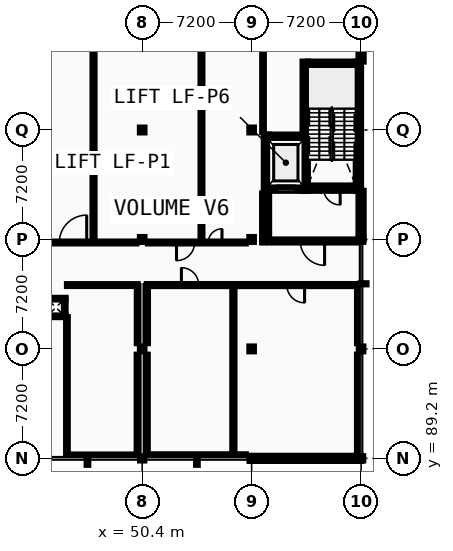
"""IFC4 building model, lengths in metres.
Left out: names, types, materials, properties, quantities, classifications, styles, units other than length and angle.
Written with IfcOpenShell. Run it as: python <this file> out.ifc"""

import sys

from ifc_helpers import new_model, si_unit, direction, frame, frame_2d, origin, origin_2d, place, context, subcontext, project, spatial, rectangle, i_section, extrude, element, fill, save


model = new_model("IFC4")
c1 = context("Model", 3, precision=1e-05, world=origin(), true_north=direction((0.0, 1.0)))
c2 = subcontext(c1, "Body", "Model", "MODEL_VIEW")
j1 = project(units=[si_unit("LENGTHUNIT", "METRE"), si_unit("PLANEANGLEUNIT", "RADIAN")], contexts=[c1])
p1 = place(None, origin())
s1 = spatial("IfcSite", under=j1, at=p1, CompositionType="ELEMENT")
p2 = place(p1, origin())
s2 = spatial("IfcBuilding", under=s1, at=p2, CompositionType="ELEMENT")
p3 = place(p2, frame((0.0, 0.0, 18.4)))
s3 = spatial("IfcBuildingStorey", under=s2, at=p3, CompositionType="ELEMENT", Elevation=18.4)
p4 = place(p3, frame((50.4, 89.2, 0.0), z_axis=(0.0, 0.0, 1.0), x_axis=(1.0, 0.0, 0.0)))
e1 = element("IfcColumn", 1, at=p4, inside=s3, PredefinedType="COLUMN", context=c2, shape_type="SweptSolid", body=[
    extrude(i_section(OverallWidth=0.28, OverallDepth=0.28, WebThickness=0.01, FlangeThickness=0.018, FilletRadius=0.024, at=origin_2d()), origin(), (0.0, 0.0, 1.0), 4.4),
])
for number, where, z_axis, x_axis in (
    (2, (50.4, 96.4, 0.0), (0.0, 0.0, 1.0), (1.0, 0.0, 0.0)),
    (3, (50.4, 103.6, 0.0), (0.0, 0.0, 1.0), (1.0, 0.0, 0.0)),
    (4, (50.4, 110.8, 0.0), (0.0, 0.0, 1.0), (1.0, 0.0, 0.0)),
):
    element("IfcColumn", number, at=place(p3, frame(where, z_axis=z_axis, x_axis=x_axis)), inside=s3, PredefinedType="COLUMN", context=c2, shape_type="SweptSolid", body=[
        extrude(i_section(OverallWidth=0.3, OverallDepth=0.32, WebThickness=0.011, FlangeThickness=0.021, FilletRadius=0.027, at=origin_2d()), origin(), (0.0, 0.0, 1.0), 4.4),
    ])
p5 = place(p3, frame((57.6, 89.2, 0.0), z_axis=(0.0, 0.0, 1.0), x_axis=(1.0, 0.0, 0.0)))
e5 = element("IfcColumn", 5, at=p5, inside=s3, PredefinedType="COLUMN", context=c2, shape_type="SweptSolid", body=[
    extrude(i_section(OverallWidth=0.28, OverallDepth=0.28, WebThickness=0.01, FlangeThickness=0.018, FilletRadius=0.024, at=origin_2d()), origin(), (0.0, 0.0, 1.0), 4.4),
])
for number, where, z_axis, x_axis in (
    (6, (57.6, 96.4, 0.0), (0.0, 0.0, 1.0), (1.0, 0.0, 0.0)),
    (7, (57.6, 103.6, 0.0), (0.0, 0.0, 1.0), (1.0, 0.0, 0.0)),
    (8, (57.6, 110.8, 0.0), (0.0, 0.0, 1.0), (1.0, 0.0, 0.0)),
):
    element("IfcColumn", number, at=place(p3, frame(where, z_axis=z_axis, x_axis=x_axis)), inside=s3, PredefinedType="COLUMN", context=c2, shape_type="SweptSolid", body=[
        extrude(i_section(OverallWidth=0.3, OverallDepth=0.32, WebThickness=0.011, FlangeThickness=0.021, FilletRadius=0.027, at=origin_2d()), origin(), (0.0, 0.0, 1.0), 4.4),
    ])
p6 = place(p3, frame((64.8, 89.2, 0.0), z_axis=(0.0, 0.0, 1.0), x_axis=(1.0, 0.0, 0.0)))
e9 = element("IfcColumn", 9, at=p6, inside=s3, PredefinedType="COLUMN", context=c2, shape_type="SweptSolid", body=[
    extrude(i_section(OverallWidth=0.28, OverallDepth=0.28, WebThickness=0.01, FlangeThickness=0.018, FilletRadius=0.024, at=origin_2d()), origin(), (0.0, 0.0, 1.0), 4.4),
])
for number, where, z_axis, x_axis in (
    (10, (64.8, 96.4, 0.0), (0.0, 0.0, 1.0), (1.0, 0.0, 0.0)),
    (11, (64.8, 103.6, 0.0), (0.0, 0.0, 1.0), (1.0, 0.0, 0.0)),
):
    element("IfcColumn", number, at=place(p3, frame(where, z_axis=z_axis, x_axis=x_axis)), inside=s3, PredefinedType="COLUMN", context=c2, shape_type="SweptSolid", body=[
        extrude(i_section(OverallWidth=0.3, OverallDepth=0.32, WebThickness=0.011, FlangeThickness=0.021, FilletRadius=0.027, at=origin_2d()), origin(), (0.0, 0.0, 1.0), 4.4),
    ])
p7 = place(p3, frame((57.49, 89.2, 0.0), z_axis=(0.0, 0.0, 1.0), x_axis=(1.0, 0.0, 0.0)))
e12 = element("IfcWall", 12, at=p7, inside=s3, PredefinedType="STANDARD", context=c2, shape_type="SweptSolid", body=[
    extrude(rectangle(XDim=7.31, YDim=0.34, at=frame_2d((3.655, 0.0))), origin(), (0.0, 0.0, 1.0), 3.94),
])
p8 = place(p7, frame((1.661, 0.0, 0.95)))
e13 = element("IfcOpeningElement", 13, at=p8, cuts=e12, PredefinedType="OPENING", context=c2, shape_type="SweptSolid", body=[
    extrude(rectangle(XDim=1.064, YDim=1.26, at=frame_2d((0.532, 0.63))), frame((0.0, 0.18, 0.0), z_axis=(0.0, -1.0, 0.0), x_axis=(1.0, 0.0, 0.0)), (0.0, 0.0, 1.0), 0.36),
])
p9 = place(p7, frame((4.585, 0.0, 0.95)))
e14 = element("IfcOpeningElement", 14, at=p9, cuts=e12, PredefinedType="OPENING", context=c2, shape_type="SweptSolid", body=[
    extrude(rectangle(XDim=1.064, YDim=1.26, at=frame_2d((0.532, 0.63))), frame((0.0, 0.18, 0.0), z_axis=(0.0, -1.0, 0.0), x_axis=(1.0, 0.0, 0.0)), (0.0, 0.0, 1.0), 0.36),
])
p10 = place(p3, frame((64.8, 103.6, 0.0), z_axis=(0.0, 0.0, 1.0), x_axis=(0.0, 1.0, 0.0)))
e15 = element("IfcWall", 15, at=p10, inside=s3, PredefinedType="STANDARD", context=c2, shape_type="SweptSolid", body=[
    extrude(rectangle(XDim=3.2, YDim=0.34, at=frame_2d((1.6, 0.0))), origin(), (0.0, 0.0, 1.0), 4.215),
])
p11 = place(p10, frame((1.17, 0.0, 0.95)))
e16 = element("IfcOpeningElement", 16, at=p11, cuts=e15, PredefinedType="OPENING", context=c2, shape_type="SweptSolid", body=[
    extrude(rectangle(XDim=0.86, YDim=1.296, at=frame_2d((0.43, 0.648))), frame((0.0, 0.18, 0.0), z_axis=(0.0, -1.0, 0.0), x_axis=(1.0, 0.0, 0.0)), (0.0, 0.0, 1.0), 0.36),
])
p12 = place(p3, frame((64.8, 115.3, 0.0), z_axis=(0.0, 0.0, 1.0), x_axis=(0.0, 1.0, 0.0)))
e17 = element("IfcWall", 17, at=p12, inside=s3, PredefinedType="STANDARD", context=c2, shape_type="SweptSolid", body=[
    extrude(rectangle(XDim=2.53, YDim=0.34, at=frame_2d((1.265, 0.0))), origin(), (0.0, 0.0, 1.0), 4.215),
])
p13 = place(p3, frame((61.3, 106.975, 0.0), z_axis=(0.0, 0.0, 1.0), x_axis=(1.0, 0.0, 0.0)))
e18 = element("IfcWall", 18, at=p13, inside=s3, PredefinedType="SHEAR", context=c2, shape_type="SweptSolid", body=[
    extrude(rectangle(XDim=3.15, YDim=0.35, at=frame_2d((1.575, 0.0))), origin(), (0.0, 0.0, 1.0), 4.215),
])
p14 = place(p13, frame((1.025, 0.0, 0.0)))
e19 = element("IfcOpeningElement", 19, at=p14, cuts=e18, PredefinedType="OPENING", context=c2, shape_type="SweptSolid", body=[
    extrude(rectangle(XDim=1.1, YDim=2.15, at=frame_2d((0.55, 1.075))), frame((0.0, 0.185, 0.0), z_axis=(0.0, -1.0, 0.0), x_axis=(1.0, 0.0, 0.0)), (0.0, 0.0, 1.0), 0.37),
])
p15 = place(p3, frame((61.3, 115.125, 0.0), z_axis=(0.0, 0.0, 1.0), x_axis=(1.0, 0.0, 0.0)))
e20 = element("IfcWall", 20, at=p15, inside=s3, PredefinedType="SHEAR", context=c2, shape_type="SweptSolid", body=[
    extrude(rectangle(XDim=3.15, YDim=0.35, at=frame_2d((1.575, 0.0))), origin(), (0.0, 0.0, 1.0), 4.215),
])
for number, where, z_axis, x_axis in (
    (21, (61.125, 106.8, 0.0), (0.0, 0.0, 1.0), (0.0, 1.0, 0.0)),
    (22, (64.625, 106.8, 0.0), (0.0, 0.0, 1.0), (0.0, 1.0, 0.0)),
):
    element("IfcWall", number, at=place(p3, frame(where, z_axis=z_axis, x_axis=x_axis)), inside=s3, PredefinedType="SHEAR", context=c2, shape_type="SweptSolid", body=[
        extrude(rectangle(XDim=8.5, YDim=0.35, at=frame_2d((4.25, 0.0))), origin(), (0.0, 0.0, 1.0), 4.215),
    ])
p16 = place(p3, frame((58.75, 106.975, 0.0), z_axis=(0.0, 0.0, 1.0), x_axis=(1.0, 0.0, 0.0)))
e23 = element("IfcWall", 23, at=p16, inside=s3, PredefinedType="SHEAR", context=c2, shape_type="SweptSolid", body=[
    extrude(rectangle(XDim=2.2, YDim=0.35, at=frame_2d((1.1, 0.0))), origin(), (0.0, 0.0, 1.0), 4.215),
])
p17 = place(p16, frame((0.5, 0.0, 0.0)))
e24 = element("IfcOpeningElement", 24, at=p17, cuts=e23, PredefinedType="OPENING", context=c2, shape_type="SweptSolid", body=[
    extrude(rectangle(XDim=1.2, YDim=2.2, at=frame_2d((0.6, 1.1))), frame((0.0, 0.185, 0.0), z_axis=(0.0, -1.0, 0.0), x_axis=(1.0, 0.0, 0.0)), (0.0, 0.0, 1.0), 0.37),
])
p18 = place(p3, frame((58.75, 110.325, 0.0), z_axis=(0.0, 0.0, 1.0), x_axis=(1.0, 0.0, 0.0)))
e25 = element("IfcWall", 25, at=p18, inside=s3, PredefinedType="SHEAR", context=c2, shape_type="SweptSolid", body=[
    extrude(rectangle(XDim=2.2, YDim=0.35, at=frame_2d((1.1, 0.0))), origin(), (0.0, 0.0, 1.0), 4.215),
])
p19 = place(p3, frame((58.575, 106.8, 0.0), z_axis=(0.0, 0.0, 1.0), x_axis=(0.0, 1.0, 0.0)))
e26 = element("IfcWall", 26, at=p19, inside=s3, PredefinedType="SHEAR", context=c2, shape_type="SweptSolid", body=[
    extrude(rectangle(XDim=3.7, YDim=0.35, at=frame_2d((1.85, 0.0))), origin(), (0.0, 0.0, 1.0), 4.215),
])
p20 = place(p3, frame((58.75, 103.5, 0.0), z_axis=(0.0, 0.0, 1.0), x_axis=(1.0, 0.0, 0.0)))
e27 = element("IfcWall", 27, at=p20, inside=s3, PredefinedType="PARTITIONING", context=c2, shape_type="SweptSolid", body=[
    extrude(rectangle(XDim=5.7, YDim=0.2, at=frame_2d((2.85, 0.0))), origin(), (0.0, 0.0, 1.0), 3.95),
])
p21 = place(p20, frame((2.05, 0.0, 0.0)))
e28 = element("IfcOpeningElement", 28, at=p21, cuts=e27, PredefinedType="OPENING", context=c2, shape_type="SweptSolid", body=[
    extrude(rectangle(XDim=1.6, YDim=2.2, at=frame_2d((0.8, 1.1))), frame((0.0, 0.11, 0.0), z_axis=(0.0, -1.0, 0.0), x_axis=(1.0, 0.0, 0.0)), (0.0, 0.0, 1.0), 0.22),
])
p22 = place(p3, frame((58.65, 103.6, 0.0), z_axis=(0.0, 0.0, 1.0), x_axis=(0.0, 1.0, 0.0)))
e29 = element("IfcWall", 29, at=p22, inside=s3, PredefinedType="PARTITIONING", context=c2, shape_type="SweptSolid", body=[
    extrude(rectangle(XDim=3.2, YDim=0.2, at=frame_2d((1.6, 0.0))), origin(), (0.0, 0.0, 1.0), 4.215),
])
for number, where, z_axis, x_axis in (
    (30, (44.09, 98.545, 0.0), (0.0, 0.0, 1.0), (1.0, 0.0, 0.0)),
    (31, (44.09, 99.705, 0.0), (0.0, 0.0, 1.0), (1.0, 0.0, 0.0)),
):
    element("IfcWall", number, at=place(p3, frame(where, z_axis=z_axis, x_axis=x_axis)), inside=s3, PredefinedType="PARTITIONING", context=c2, shape_type="SweptSolid", body=[
        extrude(rectangle(XDim=1.27, YDim=0.11, at=frame_2d((0.635, 0.0))), origin(), (0.0, 0.0, 1.0), 4.215),
    ])
p23 = place(p3, frame((45.305, 98.6, 0.0), z_axis=(0.0, 0.0, 1.0), x_axis=(0.0, 1.0, 0.0)))
e32 = element("IfcWall", 32, at=p23, inside=s3, PredefinedType="PARTITIONING", context=c2, shape_type="SweptSolid", body=[
    extrude(rectangle(XDim=1.05, YDim=0.11, at=frame_2d((0.525, 0.0))), origin(), (0.0, 0.0, 1.0), 4.215),
])
p24 = place(p3, frame((45.45, 89.4, 0.0), z_axis=(0.0, 0.0, 1.0), x_axis=(1.0, 0.0, 0.0)))
e33 = element("IfcWall", 33, at=p24, inside=s3, PredefinedType="PARTITIONING", context=c2, shape_type="SweptSolid", body=[
    extrude(rectangle(XDim=4.57, YDim=0.11, at=frame_2d((2.285, 0.0))), origin(), (0.0, 0.0, 1.0), 3.94),
])
p25 = place(p3, frame((50.78, 89.4, 0.0), z_axis=(0.0, 0.0, 1.0), x_axis=(1.0, 0.0, 0.0)))
e34 = element("IfcWall", 34, at=p25, inside=s3, PredefinedType="PARTITIONING", context=c2, shape_type="SweptSolid", body=[
    extrude(rectangle(XDim=6.44, YDim=0.135, at=frame_2d((3.22, 0.0))), origin(), (0.0, 0.0, 1.0), 3.94),
])
p26 = place(p3, frame((45.45, 100.6, 0.0), z_axis=(0.0, 0.0, 1.0), x_axis=(1.0, 0.0, 0.0)))
e35 = element("IfcWall", 35, at=p26, inside=s3, PredefinedType="PARTITIONING", context=c2, shape_type="SweptSolid", body=[
    extrude(rectangle(XDim=4.65, YDim=0.125, at=frame_2d((2.325, 0.0))), origin(), (0.0, 0.0, 1.0), 4.215),
])
p27 = place(p26, frame((0.45, 0.0, 0.0)))
e36 = element("IfcOpeningElement", 36, at=p27, cuts=e35, PredefinedType="OPENING", context=c2, shape_type="SweptSolid", body=[
    extrude(rectangle(XDim=1.0, YDim=2.1, at=frame_2d((0.5, 1.05))), frame((0.0, 0.073, 0.0), z_axis=(0.0, -1.0, 0.0), x_axis=(1.0, 0.0, 0.0)), (0.0, 0.0, 1.0), 0.145),
])
p28 = place(p3, frame((50.7, 100.6, 0.0), z_axis=(0.0, 0.0, 1.0), x_axis=(1.0, 0.0, 0.0)))
e37 = element("IfcWall", 37, at=p28, inside=s3, PredefinedType="PARTITIONING", context=c2, shape_type="SweptSolid", body=[
    extrude(rectangle(XDim=13.9, YDim=0.135, at=frame_2d((6.95, 0.0))), origin(), (0.0, 0.0, 1.0), 4.215),
])
p29 = place(p28, frame((2.28, 0.0, 0.0)))
e38 = element("IfcOpeningElement", 38, at=p29, cuts=e37, PredefinedType="OPENING", context=c2, shape_type="SweptSolid", body=[
    extrude(rectangle(XDim=1.14, YDim=2.068, at=frame_2d((0.57, 1.034))), frame((0.0, 0.078, 0.0), z_axis=(0.0, -1.0, 0.0), x_axis=(1.0, 0.0, 0.0)), (0.0, 0.0, 1.0), 0.155),
])
p30 = place(p28, frame((9.217, 0.0, 0.0)))
e39 = element("IfcOpeningElement", 39, at=p30, cuts=e37, PredefinedType="OPENING", context=c2, shape_type="SweptSolid", body=[
    extrude(rectangle(XDim=1.166, YDim=2.068, at=frame_2d((0.583, 1.034))), frame((0.0, 0.078, 0.0), z_axis=(0.0, -1.0, 0.0), x_axis=(1.0, 0.0, 0.0)), (0.0, 0.0, 1.0), 0.155),
])
p31 = place(p3, frame((43.58, 103.4, 0.0), z_axis=(0.0, 0.0, 1.0), x_axis=(1.0, 0.0, 0.0)))
e40 = element("IfcWall", 40, at=p31, inside=s3, PredefinedType="PARTITIONING", context=c2, shape_type="SweptSolid", body=[
    extrude(rectangle(XDim=6.44, YDim=0.125, at=frame_2d((3.22, 0.0))), origin(), (0.0, 0.0, 1.0), 3.95),
])
p32 = place(p31, frame((1.37, 0.0, 0.0)))
e41 = element("IfcOpeningElement", 41, at=p32, cuts=e40, PredefinedType="OPENING", context=c2, shape_type="SweptSolid", body=[
    extrude(rectangle(XDim=1.8, YDim=2.3, at=frame_2d((0.9, 1.15))), frame((0.0, 0.073, 0.0), z_axis=(0.0, -1.0, 0.0), x_axis=(1.0, 0.0, 0.0)), (0.0, 0.0, 1.0), 0.145),
])
p33 = place(p3, frame((50.78, 103.4, 0.0), z_axis=(0.0, 0.0, 1.0), x_axis=(1.0, 0.0, 0.0)))
e42 = element("IfcWall", 42, at=p33, inside=s3, PredefinedType="PARTITIONING", context=c2, shape_type="SweptSolid", body=[
    extrude(rectangle(XDim=6.44, YDim=0.125, at=frame_2d((3.22, 0.0))), origin(), (0.0, 0.0, 1.0), 3.95),
])
p34 = place(p33, frame((3.97, 0.0, 0.0)))
e43 = element("IfcOpeningElement", 43, at=p34, cuts=e42, PredefinedType="OPENING", context=c2, shape_type="SweptSolid", body=[
    extrude(rectangle(XDim=0.9, YDim=2.1, at=frame_2d((0.45, 1.05))), frame((0.0, 0.073, 0.0), z_axis=(0.0, -1.0, 0.0), x_axis=(1.0, 0.0, 0.0)), (0.0, 0.0, 1.0), 0.145),
])
p35 = place(p33, frame((1.878, 0.0, 0.0)))
e44 = element("IfcOpeningElement", 44, at=p35, cuts=e42, PredefinedType="OPENING", context=c2, shape_type="SweptSolid", body=[
    extrude(rectangle(XDim=1.192, YDim=2.068, at=frame_2d((0.596, 1.034))), frame((0.0, 0.073, 0.0), z_axis=(0.0, -1.0, 0.0), x_axis=(1.0, 0.0, 0.0)), (0.0, 0.0, 1.0), 0.145),
])
p36 = place(p3, frame((45.45, 89.455, 0.0), z_axis=(0.0, 0.0, 1.0), x_axis=(0.0, 1.0, 0.0)))
e45 = element("IfcWall", 45, at=p36, inside=s3, PredefinedType="PARTITIONING", context=c2, shape_type="SweptSolid", body=[
    extrude(rectangle(XDim=9.035, YDim=0.11, at=frame_2d((4.518, 0.0))), origin(), (0.0, 0.0, 1.0), 3.96),
])
p37 = place(p3, frame((47.2, 103.462, 0.0), z_axis=(0.0, 0.0, 1.0), x_axis=(0.0, 1.0, 0.0)))
e46 = element("IfcWall", 46, at=p37, inside=s3, PredefinedType="PARTITIONING", context=c2, shape_type="SweptSolid", body=[
    extrude(rectangle(XDim=14.338, YDim=0.135, at=frame_2d((7.169, 0.0))), origin(), (0.0, 0.0, 1.0), 4.215),
])
p38 = place(p3, frame((50.1, 89.58, 0.0), z_axis=(0.0, 0.0, 1.0), x_axis=(0.0, 1.0, 0.0)))
e47 = element("IfcWall", 47, at=p38, inside=s3, PredefinedType="PARTITIONING", context=c2, shape_type="SweptSolid", body=[
    extrude(rectangle(XDim=6.44, YDim=0.125, at=frame_2d((3.22, 0.0))), origin(), (0.0, 0.0, 1.0), 4.215),
])
p39 = place(p3, frame((50.1, 96.78, 0.0), z_axis=(0.0, 0.0, 1.0), x_axis=(0.0, 1.0, 0.0)))
e48 = element("IfcWall", 48, at=p39, inside=s3, PredefinedType="PARTITIONING", context=c2, shape_type="SweptSolid", body=[
    extrude(rectangle(XDim=3.758, YDim=0.11, at=frame_2d((1.879, 0.0))), origin(), (0.0, 0.0, 1.0), 4.215),
])
p40 = place(p3, frame((50.7, 89.58, 0.0), z_axis=(0.0, 0.0, 1.0), x_axis=(0.0, 1.0, 0.0)))
e49 = element("IfcWall", 49, at=p40, inside=s3, PredefinedType="PARTITIONING", context=c2, shape_type="SweptSolid", body=[
    extrude(rectangle(XDim=6.44, YDim=0.135, at=frame_2d((3.22, 0.0))), origin(), (0.0, 0.0, 1.0), 4.215),
])
p41 = place(p3, frame((50.7, 96.78, 0.0), z_axis=(0.0, 0.0, 1.0), x_axis=(0.0, 1.0, 0.0)))
e50 = element("IfcWall", 50, at=p41, inside=s3, PredefinedType="PARTITIONING", context=c2, shape_type="SweptSolid", body=[
    extrude(rectangle(XDim=3.752, YDim=0.16, at=frame_2d((1.876, 0.0))), origin(), (0.0, 0.0, 1.0), 3.91),
])
p42 = place(p3, frame((54.3, 103.462, 0.0), z_axis=(0.0, 0.0, 1.0), x_axis=(0.0, 1.0, 0.0)))
e51 = element("IfcWall", 51, at=p42, inside=s3, PredefinedType="PARTITIONING", context=c2, shape_type="SweptSolid", body=[
    extrude(rectangle(XDim=14.338, YDim=0.125, at=frame_2d((7.169, 0.0))), origin(), (0.0, 0.0, 1.0), 4.215),
])
p43 = place(p3, frame((56.4, 89.468, 0.0), z_axis=(0.0, 0.0, 1.0), x_axis=(0.0, 1.0, 0.0)))
e52 = element("IfcWall", 52, at=p43, inside=s3, PredefinedType="PARTITIONING", context=c2, shape_type="SweptSolid", body=[
    extrude(rectangle(XDim=11.065, YDim=0.142, at=frame_2d((5.532, 0.0))), origin(), (0.0, 0.0, 1.0), 4.215),
])
p44 = place(p3, frame((58.35, 103.4, 0.0), z_axis=(0.0, 0.0, 1.0), x_axis=(0.0, 1.0, 0.0)))
e53 = element("IfcWall", 53, at=p44, inside=s3, PredefinedType="PARTITIONING", context=c2, shape_type="SweptSolid", body=[
    extrude(rectangle(XDim=3.225, YDim=0.125, at=frame_2d((1.613, 0.0))), origin(), (0.0, 0.0, 1.0), 4.215),
])
p45 = place(p3, frame((58.35, 110.675, 0.0), z_axis=(0.0, 0.0, 1.0), x_axis=(0.0, 1.0, 0.0)))
e54 = element("IfcWall", 54, at=p45, inside=s3, PredefinedType="PARTITIONING", context=c2, shape_type="SweptSolid", body=[
    extrude(rectangle(XDim=7.125, YDim=0.11, at=frame_2d((3.562, 0.0))), origin(), (0.0, 0.0, 1.0), 4.215),
])
p46 = place(p3, frame((64.6, 89.58, 0.0), z_axis=(0.0, 0.0, 1.0), x_axis=(0.0, 1.0, 0.0)))
e55 = element("IfcWall", 55, at=p46, inside=s3, PredefinedType="PARTITIONING", context=c2, shape_type="SweptSolid", body=[
    extrude(rectangle(XDim=6.44, YDim=0.142, at=frame_2d((3.22, 0.0))), origin(), (0.0, 0.0, 1.0), 3.89),
])
p47 = place(p3, frame((64.6, 96.78, 0.0), z_axis=(0.0, 0.0, 1.0), x_axis=(0.0, 1.0, 0.0)))
e56 = element("IfcWall", 56, at=p47, inside=s3, PredefinedType="PARTITIONING", context=c2, shape_type="SweptSolid", body=[
    extrude(rectangle(XDim=3.752, YDim=0.135, at=frame_2d((1.876, 0.0))), origin(), (0.0, 0.0, 1.0), 3.9),
])
p48 = place(p8, origin())
e57 = element("IfcWindow", 57, at=p48, inside=s3, PartitioningType="SINGLE_PANEL", PredefinedType="WINDOW", context=c2, shape_type="SweptSolid", body=[
    extrude(rectangle(XDim=1.064, YDim=1.26, at=frame_2d((0.532, 0.63))), frame((0.0, 0.03, 0.0), z_axis=(0.0, -1.0, 0.0), x_axis=(1.0, 0.0, 0.0)), (0.0, 0.0, 1.0), 0.06),
])
fill(e13, e57)
p49 = place(p9, origin())
e58 = element("IfcWindow", 58, at=p49, inside=s3, PartitioningType="SINGLE_PANEL", PredefinedType="WINDOW", context=c2, shape_type="SweptSolid", body=[
    extrude(rectangle(XDim=1.064, YDim=1.26, at=frame_2d((0.532, 0.63))), frame((0.0, 0.03, 0.0), z_axis=(0.0, -1.0, 0.0), x_axis=(1.0, 0.0, 0.0)), (0.0, 0.0, 1.0), 0.06),
])
fill(e14, e58)
p50 = place(p11, origin())
e59 = element("IfcWindow", 59, at=p50, inside=s3, PartitioningType="SINGLE_PANEL", PredefinedType="WINDOW", context=c2, shape_type="SweptSolid", body=[
    extrude(rectangle(XDim=0.86, YDim=1.296, at=frame_2d((0.43, 0.648))), frame((0.0, 0.03, 0.0), z_axis=(0.0, -1.0, 0.0), x_axis=(1.0, 0.0, 0.0)), (0.0, 0.0, 1.0), 0.06),
])
fill(e16, e59)
p51 = place(p14, origin())
e60 = element("IfcDoor", 60, at=p51, inside=s3, OperationType="SINGLE_SWING_RIGHT", PredefinedType="DOOR", context=c2, shape_type="SweptSolid", body=[
    extrude(rectangle(XDim=1.1, YDim=2.15, at=frame_2d((0.55, 1.075))), frame((0.0, 0.025, 0.0), z_axis=(0.0, -1.0, 0.0), x_axis=(1.0, 0.0, 0.0)), (0.0, 0.0, 1.0), 0.05),
])
fill(e19, e60)
p52 = place(p17, origin())
e61 = element("IfcDoor", 61, at=p52, inside=s3, OperationType="SLIDING_TO_RIGHT", PredefinedType="DOOR", context=c2, shape_type="SweptSolid", body=[
    extrude(rectangle(XDim=1.2, YDim=2.2, at=frame_2d((0.6, 1.1))), frame((0.0, 0.025, 0.0), z_axis=(0.0, -1.0, 0.0), x_axis=(1.0, 0.0, 0.0)), (0.0, 0.0, 1.0), 0.05),
])
fill(e24, e61)
p53 = place(p21, origin())
e62 = element("IfcDoor", 62, at=p53, inside=s3, OperationType="DOUBLE_DOOR_SINGLE_SWING", PredefinedType="DOOR", context=c2, shape_type="SweptSolid", body=[
    extrude(rectangle(XDim=1.6, YDim=2.2, at=frame_2d((0.8, 1.1))), frame((0.0, 0.025, 0.0), z_axis=(0.0, -1.0, 0.0), x_axis=(1.0, 0.0, 0.0)), (0.0, 0.0, 1.0), 0.05),
])
fill(e28, e62)
p54 = place(p27, origin())
e63 = element("IfcDoor", 63, at=p54, inside=s3, OperationType="SLIDING_TO_LEFT", PredefinedType="DOOR", context=c2, shape_type="SweptSolid", body=[
    extrude(rectangle(XDim=1.0, YDim=2.1, at=frame_2d((0.5, 1.05))), frame((0.0, 0.025, 0.0), z_axis=(0.0, -1.0, 0.0), x_axis=(1.0, 0.0, 0.0)), (0.0, 0.0, 1.0), 0.05),
])
fill(e36, e63)
p55 = place(p34, frame((0.9, 0.0, 0.0), z_axis=(0.0, 0.0, 1.0), x_axis=(-1.0, 0.0, 0.0)))
e64 = element("IfcDoor", 64, at=p55, inside=s3, OperationType="SINGLE_SWING_RIGHT", PredefinedType="DOOR", context=c2, shape_type="SweptSolid", body=[
    extrude(rectangle(XDim=0.9, YDim=2.1, at=frame_2d((0.45, 1.05))), frame((0.0, 0.025, 0.0), z_axis=(0.0, -1.0, 0.0), x_axis=(1.0, 0.0, 0.0)), (0.0, 0.0, 1.0), 0.05),
])
fill(e43, e64)
p56 = place(p29, origin())
e65 = element("IfcDoor", 65, at=p56, inside=s3, OperationType="SINGLE_SWING_LEFT", PredefinedType="DOOR", context=c2, shape_type="SweptSolid", body=[
    extrude(rectangle(XDim=1.14, YDim=2.068, at=frame_2d((0.57, 1.034))), frame((0.0, 0.025, 0.0), z_axis=(0.0, -1.0, 0.0), x_axis=(1.0, 0.0, 0.0)), (0.0, 0.0, 1.0), 0.05),
])
fill(e38, e65)
p57 = place(p32, frame((1.8, 0.0, 0.0), z_axis=(0.0, 0.0, 1.0), x_axis=(-1.0, 0.0, 0.0)))
e66 = element("IfcDoor", 66, at=p57, inside=s3, OperationType="DOUBLE_DOOR_SINGLE_SWING", PredefinedType="DOOR", context=c2, shape_type="SweptSolid", body=[
    extrude(rectangle(XDim=1.8, YDim=2.3, at=frame_2d((0.9, 1.15))), frame((0.0, 0.025, 0.0), z_axis=(0.0, -1.0, 0.0), x_axis=(1.0, 0.0, 0.0)), (0.0, 0.0, 1.0), 0.05),
])
fill(e41, e66)
p58 = place(p30, origin())
e67 = element("IfcDoor", 67, at=p58, inside=s3, OperationType="SINGLE_SWING_RIGHT", PredefinedType="DOOR", context=c2, shape_type="SweptSolid", body=[
    extrude(rectangle(XDim=1.166, YDim=2.068, at=frame_2d((0.583, 1.034))), frame((0.0, 0.025, 0.0), z_axis=(0.0, -1.0, 0.0), x_axis=(1.0, 0.0, 0.0)), (0.0, 0.0, 1.0), 0.05),
])
fill(e39, e67)
p59 = place(p35, frame((1.192, 0.0, 0.0), z_axis=(0.0, 0.0, 1.0), x_axis=(-1.0, 0.0, 0.0)))
e68 = element("IfcDoor", 68, at=p59, inside=s3, OperationType="SINGLE_SWING_LEFT", PredefinedType="DOOR", context=c2, shape_type="SweptSolid", body=[
    extrude(rectangle(XDim=1.192, YDim=2.068, at=frame_2d((0.596, 1.034))), frame((0.0, 0.025, 0.0), z_axis=(0.0, -1.0, 0.0), x_axis=(1.0, 0.0, 0.0)), (0.0, 0.0, 1.0), 0.05),
])
fill(e44, e68)
save(model, sys.argv[1])
